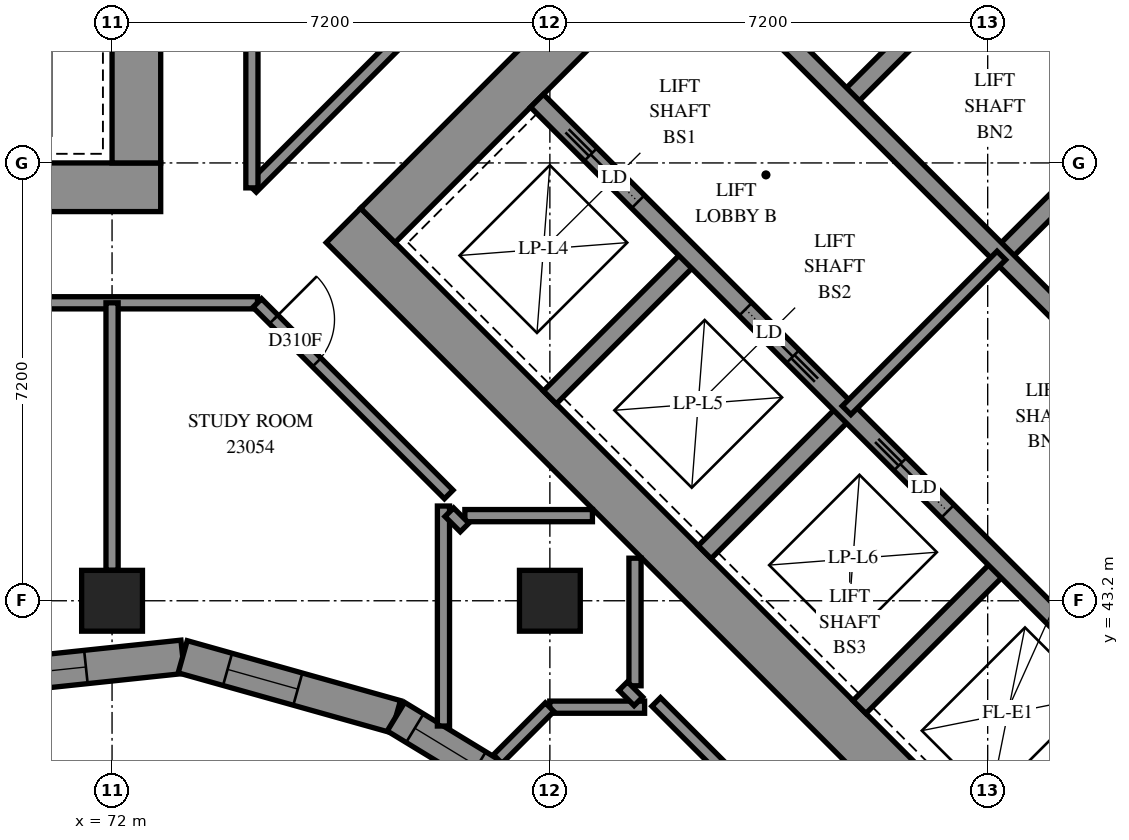
"""IFC4 building model, lengths in metres.
Left out: names, types, materials, properties, quantities, classifications, styles, units other than length and angle.
Written with IfcOpenShell. Run it as: python <this file> out.ifc"""

import sys

from ifc_helpers import new_model, si_unit, direction, frame, frame_2d, origin, origin_2d, place, context, subcontext, project, spatial, polyline, rectangle, outline, extrude, element, fill, save


model = new_model("IFC4")
c1 = context("Model", 3, precision=1e-05, world=origin(), true_north=direction((0.0, 1.0)))
c2 = subcontext(c1, "Body", "Model", "MODEL_VIEW")
j1 = project(units=[si_unit("LENGTHUNIT", "METRE"), si_unit("PLANEANGLEUNIT", "RADIAN")], contexts=[c1])
p1 = place(None, origin())
s1 = spatial("IfcSite", under=j1, at=p1, CompositionType="ELEMENT")
p2 = place(p1, origin())
s2 = spatial("IfcBuilding", under=s1, at=p2, CompositionType="ELEMENT")
p3 = place(p2, frame((0.0, 0.0, 88.0)))
s3 = spatial("IfcBuildingStorey", under=s2, at=p3, CompositionType="ELEMENT", Elevation=88.0)
for number, where, z_axis, x_axis in (
    (1, (72.0, 43.2, 0.0), (0.0, 0.0, 1.0), (1.0, 0.0, 0.0)),
    (2, (79.2, 43.2, 0.0), (0.0, 0.0, 1.0), (1.0, 0.0, 0.0)),
):
    element("IfcColumn", number, at=place(p3, frame(where, z_axis=z_axis, x_axis=x_axis)), inside=s3, PredefinedType="COLUMN", context=c2, shape_type="SweptSolid", body=[
        extrude(rectangle(XDim=1.0, YDim=1.0, at=origin_2d()), origin(), (0.0, 0.0, 1.0), 3.1),
    ])
p4 = place(p3, frame((56.8, 50.0, -0.3), z_axis=(0.0, 0.0, 1.0), x_axis=(1.0, 0.0, 0.0)))
e3 = element("IfcWall", 3, at=p4, inside=s3, PredefinedType="SHEAR", context=c2, shape_type="SweptSolid", body=[
    extrude(rectangle(XDim=16.0, YDim=0.8, at=frame_2d((8.0, 0.0))), origin(), (0.0, 0.0, 1.0), 2.7),
])
p5 = place(p3, frame((72.4, 50.4, -0.3), z_axis=(0.0, 0.0, 1.0), x_axis=(0.0, 1.0, 0.0)))
e4 = element("IfcWall", 4, at=p5, inside=s3, PredefinedType="SHEAR", context=c2, shape_type="SweptSolid", body=[
    extrude(rectangle(XDim=14.4, YDim=0.8, at=frame_2d((7.2, 0.0))), origin(), (0.0, 0.0, 1.0), 2.7),
])
p6 = place(p5, frame((4.55, 0.0, 0.3)))
e5 = element("IfcOpeningElement", 5, at=p6, cuts=e4, PredefinedType="OPENING", context=c2, shape_type="SweptSolid", body=[
    extrude(rectangle(XDim=1.1, YDim=2.1, at=frame_2d((0.55, 1.05))), frame((0.0, 0.41, 0.0), z_axis=(0.0, -1.0, 0.0), x_axis=(1.0, 0.0, 0.0)), (0.0, 0.0, 1.0), 0.82),
])
p7 = place(p5, frame((11.35, 0.0, 0.3)))
e6 = element("IfcOpeningElement", 6, at=p7, cuts=e4, PredefinedType="OPENING", context=c2, shape_type="SweptSolid", body=[
    extrude(rectangle(XDim=1.1, YDim=2.1, at=frame_2d((0.55, 1.05))), frame((0.0, 0.41, 0.0), z_axis=(0.0, -1.0, 0.0), x_axis=(1.0, 0.0, 0.0)), (0.0, 0.0, 1.0), 0.82),
])
p8 = place(p3, frame((75.806, 49.373, -0.3), z_axis=(0.0, 0.0, 1.0), x_axis=(0.7071067812, -0.7071067812, 0.0)))
e7 = element("IfcWall", 7, at=p8, inside=s3, PredefinedType="SHEAR", context=c2, shape_type="SweptSolid", body=[
    extrude(rectangle(XDim=16.0, YDim=0.8, at=frame_2d((8.0, 0.0))), origin(), (0.0, 0.0, 1.0), 2.7),
])
p9 = place(p3, frame((86.554, 60.121, -0.3), z_axis=(0.0, 0.0, 1.0), x_axis=(0.7071067812, -0.7071067812, 0.0)))
e8 = element("IfcWall", 8, at=p9, inside=s3, PredefinedType="SHEAR", context=c2, shape_type="SweptSolid", body=[
    extrude(rectangle(XDim=16.0, YDim=0.8, at=frame_2d((8.0, 0.0))), origin(), (0.0, 0.0, 1.0), 2.7),
])
p10 = place(p9, frame((10.8, 0.0, 0.3)))
e9 = element("IfcOpeningElement", 9, at=p10, cuts=e8, PredefinedType="OPENING", context=c2, shape_type="SweptSolid", body=[
    extrude(rectangle(XDim=0.8, YDim=2.1, at=frame_2d((0.4, 1.05))), frame((0.0, 0.41, 0.0), z_axis=(0.0, -1.0, 0.0), x_axis=(1.0, 0.0, 0.0)), (0.0, 0.0, 1.0), 0.82),
])
p11 = place(p3, frame((76.372, 49.373, -0.3), z_axis=(0.0, 0.0, 1.0), x_axis=(0.7071067812, 0.7071067812, 0.0)))
e10 = element("IfcWall", 10, at=p11, inside=s3, PredefinedType="SHEAR", context=c2, shape_type="SweptSolid", body=[
    extrude(rectangle(XDim=14.4, YDim=0.8, at=frame_2d((7.2, 0.0))), origin(), (0.0, 0.0, 1.0), 2.7),
])
p12 = place(p11, frame((4.55, 0.0, 0.3)))
e11 = element("IfcOpeningElement", 11, at=p12, cuts=e10, PredefinedType="OPENING", context=c2, shape_type="SweptSolid", body=[
    extrude(rectangle(XDim=1.1, YDim=2.1, at=frame_2d((0.55, 1.05))), frame((0.0, 0.41, 0.0), z_axis=(0.0, -1.0, 0.0), x_axis=(1.0, 0.0, 0.0)), (0.0, 0.0, 1.0), 0.82),
])
p13 = place(p11, frame((11.35, 0.0, 0.3)))
e12 = element("IfcOpeningElement", 12, at=p13, cuts=e10, PredefinedType="OPENING", context=c2, shape_type="SweptSolid", body=[
    extrude(rectangle(XDim=1.1, YDim=2.1, at=frame_2d((0.55, 1.05))), frame((0.0, 0.41, 0.0), z_axis=(0.0, -1.0, 0.0), x_axis=(1.0, 0.0, 0.0)), (0.0, 0.0, 1.0), 0.82),
])
p14 = place(p3, frame((87.12, 38.625, -0.3), z_axis=(0.0, 0.0, 1.0), x_axis=(0.7071067812, 0.7071067812, 0.0)))
e13 = element("IfcWall", 13, at=p14, inside=s3, PredefinedType="SHEAR", context=c2, shape_type="SweptSolid", body=[
    extrude(rectangle(XDim=14.4, YDim=0.8, at=frame_2d((7.2, 0.0))), origin(), (0.0, 0.0, 1.0), 2.7),
])
p15 = place(p14, frame((4.55, 0.0, 0.3)))
e14 = element("IfcOpeningElement", 14, at=p15, cuts=e13, PredefinedType="OPENING", context=c2, shape_type="SweptSolid", body=[
    extrude(rectangle(XDim=1.1, YDim=2.1, at=frame_2d((0.55, 1.05))), frame((0.0, 0.41, 0.0), z_axis=(0.0, -1.0, 0.0), x_axis=(1.0, 0.0, 0.0)), (0.0, 0.0, 1.0), 0.82),
])
p16 = place(p14, frame((11.35, 0.0, 0.3)))
e15 = element("IfcOpeningElement", 15, at=p16, cuts=e13, PredefinedType="OPENING", context=c2, shape_type="SweptSolid", body=[
    extrude(rectangle(XDim=1.1, YDim=2.1, at=frame_2d((0.55, 1.05))), frame((0.0, 0.41, 0.0), z_axis=(0.0, -1.0, 0.0), x_axis=(1.0, 0.0, 0.0)), (0.0, 0.0, 1.0), 0.82),
])
for number, where, z_axis, x_axis in (
    (16, (79.2, 46.544, 0.0), (0.0, 0.0, 1.0), (0.707, 0.707, 0.0)),
    (17, (84.079, 51.423, 0.0), (0.0, 0.0, 1.0), (0.707, 0.707, 0.0)),
):
    element("IfcWall", number, at=place(p3, frame(where, z_axis=z_axis, x_axis=x_axis)), inside=s3, PredefinedType="SOLIDWALL", context=c2, shape_type="SweptSolid", body=[
        extrude(rectangle(XDim=3.3, YDim=0.3, at=frame_2d((1.65, 0.0))), origin(), (0.0, 0.0, 1.0), 3.1),
    ])
p17 = place(p3, frame((81.746, 43.999, 0.0), z_axis=(0.0, 0.0, 1.0), x_axis=(0.7071067812, 0.7071067812, 0.0)))
e18 = element("IfcWall", 18, at=p17, inside=s3, PredefinedType="SOLIDWALL", context=c2, shape_type="SweptSolid", body=[
    extrude(rectangle(XDim=3.3, YDim=0.3, at=frame_2d((1.65, 0.0))), origin(), (0.0, 0.0, 1.0), 3.1),
])
p18 = place(p3, frame((86.625, 48.878, 0.0), z_axis=(0.0, 0.0, 1.0), x_axis=(0.7071067812, 0.7071067812, 0.0)))
e19 = element("IfcWall", 19, at=p18, inside=s3, PredefinedType="SOLIDWALL", context=c2, shape_type="SweptSolid", body=[
    extrude(rectangle(XDim=3.3, YDim=0.3, at=frame_2d((1.65, 0.0))), origin(), (0.0, 0.0, 1.0), 3.1),
])
p19 = place(p3, frame((84.291, 41.453, 0.0), z_axis=(0.0, 0.0, 1.0), x_axis=(0.7071067812, 0.7071067812, 0.0)))
e20 = element("IfcWall", 20, at=p19, inside=s3, PredefinedType="SOLIDWALL", context=c2, shape_type="SweptSolid", body=[
    extrude(rectangle(XDim=3.3, YDim=0.3, at=frame_2d((1.65, 0.0))), origin(), (0.0, 0.0, 1.0), 3.1),
])
p20 = place(p3, frame((78.988, 51.423, 0.0), z_axis=(0.0, 0.0, 1.0), x_axis=(0.7071067812, -0.7071067812, 0.0)))
e21 = element("IfcWall", 21, at=p20, inside=s3, PredefinedType="SOLIDWALL", context=c2, shape_type="SweptSolid", body=[
    extrude(rectangle(XDim=14.4, YDim=0.3, at=frame_2d((7.2, 0.0))), origin(), (0.0, 0.0, 1.0), 3.1),
])
p21 = place(p20, frame((1.25, 0.0, 0.0)))
e22 = element("IfcOpeningElement", 22, at=p21, cuts=e21, PredefinedType="OPENING", context=c2, shape_type="SweptSolid", body=[
    extrude(rectangle(XDim=1.1, YDim=2.1, at=frame_2d((0.55, 1.05))), frame((0.0, 0.16, 0.0), z_axis=(0.0, -1.0, 0.0), x_axis=(1.0, 0.0, 0.0)), (0.0, 0.0, 1.0), 0.32),
])
p22 = place(p20, frame((4.85, 0.0, 0.0)))
e23 = element("IfcOpeningElement", 23, at=p22, cuts=e21, PredefinedType="OPENING", context=c2, shape_type="SweptSolid", body=[
    extrude(rectangle(XDim=1.1, YDim=2.1, at=frame_2d((0.55, 1.05))), frame((0.0, 0.16, 0.0), z_axis=(0.0, -1.0, 0.0), x_axis=(1.0, 0.0, 0.0)), (0.0, 0.0, 1.0), 0.32),
])
p23 = place(p20, frame((8.45, 0.0, 0.0)))
e24 = element("IfcOpeningElement", 24, at=p23, cuts=e21, PredefinedType="OPENING", context=c2, shape_type="SweptSolid", body=[
    extrude(rectangle(XDim=1.1, YDim=2.1, at=frame_2d((0.55, 1.05))), frame((0.0, 0.16, 0.0), z_axis=(0.0, -1.0, 0.0), x_axis=(1.0, 0.0, 0.0)), (0.0, 0.0, 1.0), 0.32),
])
p24 = place(p20, frame((12.05, 0.0, 0.0)))
e25 = element("IfcOpeningElement", 25, at=p24, cuts=e21, PredefinedType="OPENING", context=c2, shape_type="SweptSolid", body=[
    extrude(rectangle(XDim=1.1, YDim=2.1, at=frame_2d((0.55, 1.05))), frame((0.0, 0.16, 0.0), z_axis=(0.0, -1.0, 0.0), x_axis=(1.0, 0.0, 0.0)), (0.0, 0.0, 1.0), 0.32),
])
p25 = place(p3, frame((81.534, 53.969, 0.0), z_axis=(0.0, 0.0, 1.0), x_axis=(0.707103309, -0.7071102534, 0.0)))
e26 = element("IfcWall", 26, at=p25, inside=s3, PredefinedType="SOLIDWALL", context=c2, shape_type="SweptSolid", body=[
    extrude(rectangle(XDim=14.4, YDim=0.3, at=frame_2d((7.2, 0.0))), origin(), (0.0, 0.0, 1.0), 3.1),
])
p26 = place(p25, frame((12.05, 0.0, 0.0)))
e27 = element("IfcOpeningElement", 27, at=p26, cuts=e26, PredefinedType="OPENING", context=c2, shape_type="SweptSolid", body=[
    extrude(rectangle(XDim=1.1, YDim=2.1, at=frame_2d((0.55, 1.05))), frame((0.0, 0.16, 0.0), z_axis=(0.0, -1.0, 0.0), x_axis=(1.0, 0.0, 0.0)), (0.0, 0.0, 1.0), 0.32),
])
p27 = place(p3, frame((83.867, 56.302, 0.0), z_axis=(0.0, 0.0, 1.0), x_axis=(0.7071137256, -0.7070998367, 0.0)))
e28 = element("IfcWall", 28, at=p27, inside=s3, PredefinedType="SOLIDWALL", context=c2, shape_type="SweptSolid", body=[
    extrude(rectangle(XDim=7.2, YDim=0.3, at=frame_2d((3.6, 0.0))), origin(), (0.0, 0.0, 1.0), 3.1),
])
p28 = place(p3, frame((69.718, 41.916, 0.0), z_axis=(0.0, 0.0, 1.0), x_axis=(0.9944739153, 0.1049839596, 0.0)))
e29 = element("IfcWall", 29, at=p28, inside=s3, PredefinedType="SOLIDWALL", context=c2, shape_type="SweptSolid", body=[
    extrude(outline(polyline([(-0.029, -0.275), (3.41, -0.275), (3.515, 0.275), (0.029, 0.275), (-0.029, -0.275)])), origin(), (0.0, 0.0, 1.0), 3.1),
])
p29 = place(p28, frame((0.662, 0.0, 0.5)))
e30 = element("IfcOpeningElement", 30, at=p29, cuts=e29, PredefinedType="OPENING", context=c2, shape_type="SweptSolid", body=[
    extrude(rectangle(XDim=1.2, YDim=2.45, at=frame_2d((0.6, 1.225))), frame((0.0, 0.285, 0.0), z_axis=(0.0, -1.0, 0.0), x_axis=(1.0, 0.0, 0.0)), (0.0, 0.0, 1.0), 0.57),
])
p30 = place(p3, frame((73.162, 42.279, 0.0), z_axis=(0.0, 0.0, 1.0), x_axis=(0.9627092747, -0.2705380793, 0.0)))
e31 = element("IfcWall", 31, at=p30, inside=s3, PredefinedType="SOLIDWALL", context=c2, shape_type="SweptSolid", body=[
    extrude(outline(polyline([(0.053, -0.275), (3.605, -0.275), (3.68, 0.275), (-0.053, 0.275), (0.053, -0.275)])), origin(), (0.0, 0.0, 1.0), 3.1),
])
p31 = place(p30, frame((0.766, 0.0, 0.5)))
e32 = element("IfcOpeningElement", 32, at=p31, cuts=e31, PredefinedType="OPENING", context=c2, shape_type="SweptSolid", body=[
    extrude(rectangle(XDim=1.2, YDim=2.45, at=frame_2d((0.6, 1.225))), frame((0.0, 0.285, 0.0), z_axis=(0.0, -1.0, 0.0), x_axis=(1.0, 0.0, 0.0)), (0.0, 0.0, 1.0), 0.57),
])
p32 = place(p3, frame((76.669, 41.294, 0.0), z_axis=(0.0, 0.0, 1.0), x_axis=(0.8543182431, -0.5197502664, 0.0)))
e33 = element("IfcWall", 33, at=p32, inside=s3, PredefinedType="SOLIDWALL", context=c2, shape_type="SweptSolid", body=[
    extrude(outline(polyline([(0.038, -0.275), (4.1, -0.275), (4.192, 0.275), (-0.038, 0.275), (0.038, -0.275)])), origin(), (0.0, 0.0, 1.0), 3.1),
])
p33 = place(p32, frame((0.363, 0.0, 0.5)))
e34 = element("IfcOpeningElement", 34, at=p33, cuts=e33, PredefinedType="OPENING", context=c2, shape_type="SweptSolid", body=[
    extrude(rectangle(XDim=1.2, YDim=2.45, at=frame_2d((0.6, 1.225))), frame((0.0, 0.285, 0.0), z_axis=(0.0, -1.0, 0.0), x_axis=(1.0, 0.0, 0.0)), (0.0, 0.0, 1.0), 0.57),
])
p34 = place(p32, frame((2.236, 0.0, 0.5)))
e35 = element("IfcOpeningElement", 35, at=p34, cuts=e33, PredefinedType="OPENING", context=c2, shape_type="SweptSolid", body=[
    extrude(rectangle(XDim=1.2, YDim=2.45, at=frame_2d((0.6, 1.225))), frame((0.0, 0.285, 0.0), z_axis=(0.0, -1.0, 0.0), x_axis=(1.0, 0.0, 0.0)), (0.0, 0.0, 1.0), 0.57),
])
p35 = place(p3, frame((84.079, 46.332, 0.0), z_axis=(0.0, 0.0, 1.0), x_axis=(0.7071067812, 0.7071067812, 0.0)))
e36 = element("IfcWall", 36, at=p35, inside=s3, PredefinedType="PARTITIONING", context=c2, shape_type="SweptSolid", body=[
    extrude(rectangle(XDim=3.6, YDim=0.2, at=frame_2d((1.8, 0.0))), origin(), (0.0, 0.0, 1.0), 3.1),
])
p36 = place(p3, frame((55.3, 48.1, 0.0), z_axis=(0.0, 0.0, 1.0), x_axis=(1.0, 0.0, 0.0)))
e37 = element("IfcWall", 37, at=p36, inside=s3, PredefinedType="PARTITIONING", context=c2, shape_type="SweptSolid", body=[
    extrude(rectangle(XDim=19.092, YDim=0.2, at=frame_2d((9.546, 0.0))), origin(), (0.0, 0.0, 1.0), 3.1),
])
p37 = place(p36, frame((6.199, 0.0, 0.0)))
e38 = element("IfcOpeningElement", 38, at=p37, cuts=e37, PredefinedType="OPENING", context=c2, shape_type="SweptSolid", body=[
    extrude(rectangle(XDim=0.9, YDim=2.1, at=frame_2d((0.45, 1.05))), frame((0.0, 0.11, 0.0), z_axis=(0.0, -1.0, 0.0), x_axis=(1.0, 0.0, 0.0)), (0.0, 0.0, 1.0), 0.22),
])
p38 = place(p36, frame((13.363, 0.0, 0.0)))
e39 = element("IfcOpeningElement", 39, at=p38, cuts=e37, PredefinedType="OPENING", context=c2, shape_type="SweptSolid", body=[
    extrude(rectangle(XDim=1.0, YDim=2.1, at=frame_2d((0.5, 1.05))), frame((0.0, 0.11, 0.0), z_axis=(0.0, -1.0, 0.0), x_axis=(1.0, 0.0, 0.0)), (0.0, 0.0, 1.0), 0.22),
])
p39 = place(p3, frame((86.835, 35.655, 0.0), z_axis=(0.0, 0.0, 1.0), x_axis=(0.7071067812, 0.7071067812, 0.0)))
e40 = element("IfcWall", 40, at=p39, inside=s3, PredefinedType="PARTITIONING", context=c2, shape_type="SweptSolid", body=[
    extrude(rectangle(XDim=8.451, YDim=0.2, at=frame_2d((4.226, 0.0))), origin(), (0.0, 0.0, 1.0), 3.1),
])
p40 = place(p39, frame((7.192, 0.0, 0.0)))
e41 = element("IfcOpeningElement", 41, at=p40, cuts=e40, PredefinedType="OPENING", context=c2, shape_type="SweptSolid", body=[
    extrude(rectangle(XDim=1.0, YDim=2.1, at=frame_2d((0.5, 1.05))), frame((0.0, 0.11, 0.0), z_axis=(0.0, -1.0, 0.0), x_axis=(1.0, 0.0, 0.0)), (0.0, 0.0, 1.0), 0.22),
])
p41 = place(p3, frame((80.948, 41.536, 0.0), z_axis=(0.0, 0.0, 1.0), x_axis=(0.7071067812, -0.7071067812, 0.0)))
e42 = element("IfcWall", 42, at=p41, inside=s3, PredefinedType="PARTITIONING", context=c2, shape_type="SweptSolid", body=[
    extrude(rectangle(XDim=6.822, YDim=0.2, at=frame_2d((3.411, 0.0))), origin(), (0.0, 0.0, 1.0), 3.1),
])
p42 = place(p3, frame((74.388, 48.096, 0.0), z_axis=(0.0, 0.0, 1.0), x_axis=(0.7071067812, -0.7071067812, 0.0)))
e43 = element("IfcWall", 43, at=p42, inside=s3, PredefinedType="PARTITIONING", context=c2, shape_type="SweptSolid", body=[
    extrude(rectangle(XDim=4.452, YDim=0.2, at=frame_2d((2.226, 0.0))), origin(), (0.0, 0.0, 1.0), 3.1),
])
p43 = place(p42, frame((0.382, 0.0, 0.0)))
e44 = element("IfcOpeningElement", 44, at=p43, cuts=e43, PredefinedType="OPENING", context=c2, shape_type="SweptSolid", body=[
    extrude(rectangle(XDim=1.0, YDim=2.1, at=frame_2d((0.5, 1.05))), frame((0.0, 0.11, 0.0), z_axis=(0.0, -1.0, 0.0), x_axis=(1.0, 0.0, 0.0)), (0.0, 0.0, 1.0), 0.22),
])
p44 = place(p3, frame((72.0, 43.7, 0.0), z_axis=(0.0, 0.0, 1.0), x_axis=(0.0, 1.0, 0.0)))
e45 = element("IfcWall", 45, at=p44, inside=s3, PredefinedType="PARTITIONING", context=c2, shape_type="SweptSolid", body=[
    extrude(rectangle(XDim=4.4, YDim=0.2, at=frame_2d((2.2, 0.0))), origin(), (0.0, 0.0, 1.0), 3.1),
])
p45 = place(p3, frame((74.301, 49.991, 0.0), z_axis=(0.0, 0.0, 1.0), x_axis=(0.7071067812, 0.7071067812, 0.0)))
e46 = element("IfcWall", 46, at=p45, inside=s3, PredefinedType="PARTITIONING", context=c2, shape_type="SweptSolid", body=[
    extrude(rectangle(XDim=4.183, YDim=0.2, at=frame_2d((2.092, 0.0))), origin(), (0.0, 0.0, 1.0), 3.1),
])
p46 = place(p3, frame((77.45, 41.14, 0.0), z_axis=(0.0, 0.0, 1.0), x_axis=(0.0, 1.0, 0.0)))
e47 = element("IfcWall", 47, at=p46, inside=s3, PredefinedType="PARTITIONING", context=c2, shape_type="SweptSolid", body=[
    extrude(rectangle(XDim=3.618, YDim=0.2, at=frame_2d((1.809, 0.0))), origin(), (0.0, 0.0, 1.0), 3.1),
])
p47 = place(p3, frame((74.3, 49.99, 0.0), z_axis=(0.0, 0.0, 1.0), x_axis=(0.0, 1.0, 0.0)))
e48 = element("IfcWall", 48, at=p47, inside=s3, PredefinedType="PARTITIONING", context=c2, shape_type="SweptSolid", body=[
    extrude(rectangle(XDim=2.96, YDim=0.2, at=frame_2d((1.48, 0.0))), origin(), (0.0, 0.0, 1.0), 3.1),
])
for number, where, z_axis, x_axis in (
    (49, (77.802, 44.6, 0.0), (0.0, 0.0, 1.0), (1.0, 0.0, 0.0)),
    (50, (80.6, 41.802, 0.0), (0.0, 0.0, 1.0), (0.0, 1.0, 0.0)),
):
    element("IfcWall", number, at=place(p3, frame(where, z_axis=z_axis, x_axis=x_axis)), inside=s3, PredefinedType="PARTITIONING", context=c2, shape_type="SweptSolid", body=[
        extrude(rectangle(XDim=2.098, YDim=0.2, at=frame_2d((1.049, 0.0))), origin(), (0.0, 0.0, 1.0), 3.1),
    ])
p48 = place(p3, frame((79.198, 41.45, 0.0), z_axis=(0.0, 0.0, 1.0), x_axis=(1.0, 0.0, 0.0)))
e51 = element("IfcWall", 51, at=p48, inside=s3, PredefinedType="PARTITIONING", context=c2, shape_type="SweptSolid", body=[
    extrude(rectangle(XDim=1.56, YDim=0.2, at=frame_2d((0.78, 0.0))), origin(), (0.0, 0.0, 1.0), 3.1),
])
p49 = place(p3, frame((78.342, 40.597, 0.0), z_axis=(0.0, 0.0, 1.0), x_axis=(0.7071482161, 0.7070653439, 0.0)))
e52 = element("IfcWall", 52, at=p49, inside=s3, PredefinedType="PARTITIONING", context=c2, shape_type="SweptSolid", body=[
    extrude(rectangle(XDim=1.207, YDim=0.2, at=frame_2d((0.603, 0.0))), origin(), (0.0, 0.0, 1.0), 3.1),
])
for number, where, z_axis, x_axis in (
    (53, (77.546, 44.656, 0.0), (0.0, 0.0, 1.0), (0.707, -0.707, 0.0)),
    (54, (80.405, 41.797, 0.0), (0.0, 0.0, 1.0), (0.707, -0.707, 0.0)),
):
    element("IfcWall", number, at=place(p3, frame(where, z_axis=z_axis, x_axis=x_axis)), inside=s3, PredefinedType="PARTITIONING", context=c2, shape_type="SweptSolid", body=[
        extrude(rectangle(XDim=0.355, YDim=0.2, at=frame_2d((0.177, 0.0))), origin(), (0.0, 0.0, 1.0), 3.1),
    ])
p50 = place(p29, origin())
e55 = element("IfcWindow", 55, at=p50, inside=s3, PartitioningType="SINGLE_PANEL", PredefinedType="WINDOW", context=c2, shape_type="SweptSolid", body=[
    extrude(rectangle(XDim=1.2, YDim=2.45, at=frame_2d((0.6, 1.225))), frame((0.0, 0.155, 0.0), z_axis=(0.0, -1.0, 0.0), x_axis=(1.0, 0.0, 0.0)), (0.0, 0.0, 1.0), 0.06),
])
fill(e30, e55)
p51 = place(p31, origin())
e56 = element("IfcWindow", 56, at=p51, inside=s3, PartitioningType="SINGLE_PANEL", PredefinedType="WINDOW", context=c2, shape_type="SweptSolid", body=[
    extrude(rectangle(XDim=1.2, YDim=2.45, at=frame_2d((0.6, 1.225))), frame((0.0, 0.155, 0.0), z_axis=(0.0, -1.0, 0.0), x_axis=(1.0, 0.0, 0.0)), (0.0, 0.0, 1.0), 0.06),
])
fill(e32, e56)
p52 = place(p33, origin())
e57 = element("IfcWindow", 57, at=p52, inside=s3, PartitioningType="SINGLE_PANEL", PredefinedType="WINDOW", context=c2, shape_type="SweptSolid", body=[
    extrude(rectangle(XDim=1.2, YDim=2.45, at=frame_2d((0.6, 1.225))), frame((0.0, 0.155, 0.0), z_axis=(0.0, -1.0, 0.0), x_axis=(1.0, 0.0, 0.0)), (0.0, 0.0, 1.0), 0.06),
])
fill(e34, e57)
p53 = place(p21, origin())
e58 = element("IfcDoor", 58, at=p53, inside=s3, OperationType="SLIDING_TO_LEFT", PredefinedType="DOOR", context=c2, shape_type="SweptSolid", body=[
    extrude(rectangle(XDim=1.1, YDim=2.1, at=frame_2d((0.55, 1.05))), frame((0.0, 0.025, 0.0), z_axis=(0.0, -1.0, 0.0), x_axis=(1.0, 0.0, 0.0)), (0.0, 0.0, 1.0), 0.05),
])
fill(e22, e58)
p54 = place(p22, origin())
e59 = element("IfcDoor", 59, at=p54, inside=s3, OperationType="SLIDING_TO_RIGHT", PredefinedType="DOOR", context=c2, shape_type="SweptSolid", body=[
    extrude(rectangle(XDim=1.1, YDim=2.1, at=frame_2d((0.55, 1.05))), frame((0.0, 0.025, 0.0), z_axis=(0.0, -1.0, 0.0), x_axis=(1.0, 0.0, 0.0)), (0.0, 0.0, 1.0), 0.05),
])
fill(e23, e59)
p55 = place(p23, origin())
e60 = element("IfcDoor", 60, at=p55, inside=s3, OperationType="SLIDING_TO_LEFT", PredefinedType="DOOR", context=c2, shape_type="SweptSolid", body=[
    extrude(rectangle(XDim=1.1, YDim=2.1, at=frame_2d((0.55, 1.05))), frame((0.0, 0.025, 0.0), z_axis=(0.0, -1.0, 0.0), x_axis=(1.0, 0.0, 0.0)), (0.0, 0.0, 1.0), 0.05),
])
fill(e24, e60)
p56 = place(p43, origin())
e61 = element("IfcDoor", 61, at=p56, inside=s3, OperationType="SINGLE_SWING_LEFT", PredefinedType="DOOR", context=c2, shape_type="SweptSolid", body=[
    extrude(rectangle(XDim=1.0, YDim=2.1, at=frame_2d((0.5, 1.05))), frame((0.0, 0.025, 0.0), z_axis=(0.0, -1.0, 0.0), x_axis=(1.0, 0.0, 0.0)), (0.0, 0.0, 1.0), 0.05),
])
fill(e44, e61)
save(model, sys.argv[1])
